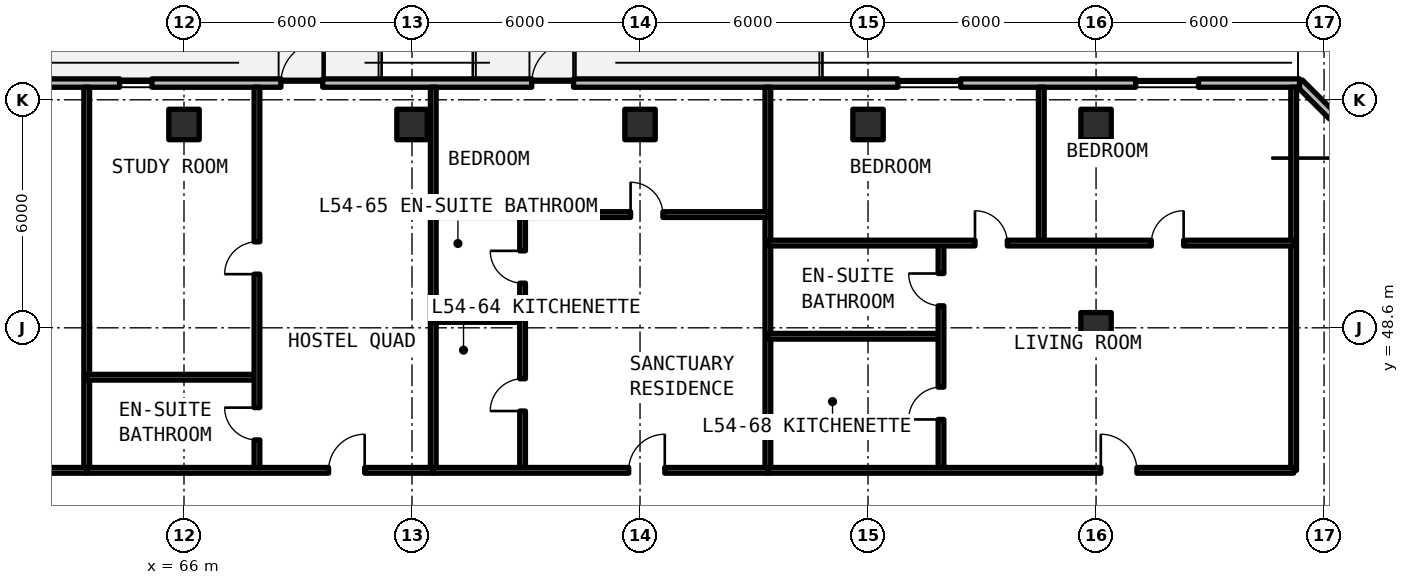
"""IFC4 building model, lengths in metres.
Left out: names, types, materials, properties, quantities, classifications, styles, units other than length and angle.
Written with IfcOpenShell. Run it as: python <this file> out.ifc"""

import sys

from ifc_helpers import new_model, si_unit, direction, frame, frame_2d, origin, origin_2d, place, context, subcontext, project, spatial, rectangle, extrude, element, fill, save


model = new_model("IFC4")
c1 = context("Model", 3, precision=1e-05, world=origin(), true_north=direction((0.0, 1.0)))
c2 = subcontext(c1, "Body", "Model", "MODEL_VIEW")
j1 = project(units=[si_unit("LENGTHUNIT", "METRE"), si_unit("PLANEANGLEUNIT", "RADIAN")], contexts=[c1])
p1 = place(None, origin())
s1 = spatial("IfcSite", under=j1, at=p1, CompositionType="ELEMENT")
p2 = place(p1, origin())
s2 = spatial("IfcBuilding", under=s1, at=p2, CompositionType="ELEMENT")
p3 = place(p2, frame((0.0, 0.0, 195.03)))
s3 = spatial("IfcBuildingStorey", under=s2, at=p3, CompositionType="ELEMENT", Elevation=195.03)
for number, where, z_axis, x_axis in (
    (1, (90.0, 48.6, 0.0), (0.0, 0.0, 1.0), (1.0, 0.0, 0.0)),
    (2, (66.0, 53.95, 0.0), (0.0, 0.0, 1.0), (1.0, 0.0, 0.0)),
    (3, (72.0, 53.95, 0.0), (0.0, 0.0, 1.0), (1.0, 0.0, 0.0)),
    (4, (78.0, 53.95, 0.0), (0.0, 0.0, 1.0), (1.0, 0.0, 0.0)),
    (5, (84.0, 53.95, 0.0), (0.0, 0.0, 1.0), (1.0, 0.0, 0.0)),
    (6, (90.0, 53.95, 0.0), (0.0, 0.0, 1.0), (1.0, 0.0, 0.0)),
):
    element("IfcColumn", number, at=place(p3, frame(where, z_axis=z_axis, x_axis=x_axis)), inside=s3, PredefinedType="COLUMN", context=c2, shape_type="SweptSolid", body=[
        extrude(rectangle(XDim=0.8, YDim=0.8, at=origin_2d()), origin(), (0.0, 0.0, 1.0), 3.3),
    ])
p4 = place(p3, frame((99.49, 50.904, 0.0), z_axis=(0.0, 0.0, 1.0), x_axis=(-0.707085909342, 0.707127652415, 0.0)))
e7 = element("IfcWall", 7, at=p4, inside=s3, PredefinedType="SOLIDWALL", context=c2, shape_type="SweptSolid", body=[
    extrude(rectangle(XDim=5.849, YDim=0.22, at=frame_2d((2.924, 0.0))), origin(), (0.0, 0.0, 1.0), 3.08),
])
p5 = place(p4, frame((1.224, 0.0, 0.78)))
e8 = element("IfcOpeningElement", 8, at=p5, cuts=e7, PredefinedType="OPENING", context=c2, shape_type="SweptSolid", body=[
    extrude(rectangle(XDim=3.4, YDim=1.66, at=frame_2d((1.7, 0.83))), frame((0.0, 0.12, 0.0), z_axis=(0.0, -1.0, 0.0), x_axis=(1.0, 0.0, 0.0)), (0.0, 0.0, 1.0), 0.24),
])
p6 = place(p3, frame((95.354, 55.04, 0.0), z_axis=(0.0, 0.0, 1.0), x_axis=(-1.0, 0.0, 0.0)))
e9 = element("IfcWall", 9, at=p6, inside=s3, PredefinedType="SOLIDWALL", context=c2, shape_type="SweptSolid", body=[
    extrude(rectangle(XDim=43.244, YDim=0.22, at=frame_2d((21.622, 0.0))), origin(), (0.0, 0.0, 1.0), 3.08),
])
p7 = place(p6, frame((25.704, 0.0, 0.0)))
e10 = element("IfcOpeningElement", 10, at=p7, cuts=e9, PredefinedType="OPENING", context=c2, shape_type="SweptSolid", body=[
    extrude(rectangle(XDim=1.1, YDim=2.15, at=frame_2d((0.55, 1.075))), frame((0.0, 0.12, 0.0), z_axis=(0.0, -1.0, 0.0), x_axis=(1.0, 0.0, 0.0)), (0.0, 0.0, 1.0), 0.24),
])
p8 = place(p6, frame((19.104, 0.0, 0.0)))
e11 = element("IfcOpeningElement", 11, at=p8, cuts=e9, PredefinedType="OPENING", context=c2, shape_type="SweptSolid", body=[
    extrude(rectangle(XDim=1.1, YDim=2.15, at=frame_2d((0.55, 1.075))), frame((0.0, 0.12, 0.0), z_axis=(0.0, -1.0, 0.0), x_axis=(1.0, 0.0, 0.0)), (0.0, 0.0, 1.0), 0.24),
])
p9 = place(p6, frame((36.749, 0.0, 0.78)))
e12 = element("IfcOpeningElement", 12, at=p9, cuts=e9, PredefinedType="OPENING", context=c2, shape_type="SweptSolid", body=[
    extrude(rectangle(XDim=1.65, YDim=1.66, at=frame_2d((0.825, 0.83))), frame((0.0, 0.12, 0.0), z_axis=(0.0, -1.0, 0.0), x_axis=(1.0, 0.0, 0.0)), (0.0, 0.0, 1.0), 0.24),
])
p10 = place(p6, frame((30.199, 0.0, 0.78)))
e13 = element("IfcOpeningElement", 13, at=p10, cuts=e9, PredefinedType="OPENING", context=c2, shape_type="SweptSolid", body=[
    extrude(rectangle(XDim=0.85, YDim=1.65, at=frame_2d((0.425, 0.825))), frame((0.0, 0.12, 0.0), z_axis=(0.0, -1.0, 0.0), x_axis=(1.0, 0.0, 0.0)), (0.0, 0.0, 1.0), 0.24),
])
p11 = place(p6, frame((8.918, 0.0, 0.78)))
e14 = element("IfcOpeningElement", 14, at=p11, cuts=e9, PredefinedType="OPENING", context=c2, shape_type="SweptSolid", body=[
    extrude(rectangle(XDim=1.65, YDim=1.66, at=frame_2d((0.825, 0.83))), frame((0.0, 0.12, 0.0), z_axis=(0.0, -1.0, 0.0), x_axis=(1.0, 0.0, 0.0)), (0.0, 0.0, 1.0), 0.24),
])
p12 = place(p6, frame((2.66, 0.0, 0.78)))
e15 = element("IfcOpeningElement", 15, at=p12, cuts=e9, PredefinedType="OPENING", context=c2, shape_type="SweptSolid", body=[
    extrude(rectangle(XDim=1.65, YDim=1.66, at=frame_2d((0.825, 0.83))), frame((0.0, 0.12, 0.0), z_axis=(0.0, -1.0, 0.0), x_axis=(1.0, 0.0, 0.0)), (0.0, 0.0, 1.0), 0.24),
])
for number, where, z_axis, x_axis in (
    (16, (95.2, 44.85, 0.0), (0.0, 0.0, 1.0), (0.0, 1.0, 0.0)),
    (17, (63.44, 44.85, 0.0), (0.0, 0.0, 1.0), (0.0, 1.0, 0.0)),
):
    element("IfcWall", number, at=place(p3, frame(where, z_axis=z_axis, x_axis=x_axis)), inside=s3, PredefinedType="SOLIDWALL", context=c2, shape_type="SweptSolid", body=[
        extrude(rectangle(XDim=10.08, YDim=0.15, at=frame_2d((5.04, 0.0))), origin(), (0.0, 0.0, 1.0), 2.35),
    ])
p13 = place(p3, frame((52.12, 44.85, 0.0), z_axis=(0.0, 0.0, 1.0), x_axis=(1.0, 0.0, 0.0)))
e18 = element("IfcWall", 18, at=p13, inside=s3, PredefinedType="SOLIDWALL", context=c2, shape_type="SweptSolid", body=[
    extrude(rectangle(XDim=11.32, YDim=0.15, at=frame_2d((5.66, 0.0))), origin(), (0.0, 0.0, 1.0), 2.35),
])
p14 = place(p13, frame((5.11, 0.0, 0.0)))
e19 = element("IfcOpeningElement", 19, at=p14, cuts=e18, PredefinedType="OPENING", context=c2, shape_type="SweptSolid", body=[
    extrude(rectangle(XDim=1.1, YDim=2.15, at=frame_2d((0.55, 1.075))), frame((0.0, 0.085, 0.0), z_axis=(0.0, -1.0, 0.0), x_axis=(1.0, 0.0, 0.0)), (0.0, 0.0, 1.0), 0.17),
])
p15 = place(p3, frame((72.559, 44.85, 0.0), z_axis=(0.0, 0.0, 1.0), x_axis=(0.0, 1.0, 0.0)))
e20 = element("IfcWall", 20, at=p15, inside=s3, PredefinedType="SOLIDWALL", context=c2, shape_type="SweptSolid", body=[
    extrude(rectangle(XDim=10.08, YDim=0.15, at=frame_2d((5.04, 0.0))), origin(), (0.0, 0.0, 1.0), 2.35),
])
p16 = place(p3, frame((63.44, 47.3, 0.0), z_axis=(0.0, 0.0, 1.0), x_axis=(1.0, 0.0, 0.0)))
e21 = element("IfcWall", 21, at=p16, inside=s3, PredefinedType="PARTITIONING", context=c2, shape_type="SweptSolid", body=[
    extrude(rectangle(XDim=4.48, YDim=0.15, at=frame_2d((2.24, 0.0))), origin(), (0.0, 0.0, 1.0), 2.35),
])
p17 = place(p3, frame((67.92, 44.85, 0.0), z_axis=(0.0, 0.0, 1.0), x_axis=(0.0, 1.0, 0.0)))
e22 = element("IfcWall", 22, at=p17, inside=s3, PredefinedType="PARTITIONING", context=c2, shape_type="SweptSolid", body=[
    extrude(rectangle(XDim=10.08, YDim=0.15, at=frame_2d((5.04, 0.0))), origin(), (0.0, 0.0, 1.0), 2.35),
])
p18 = place(p17, frame((0.8, 0.0, 0.0)))
e23 = element("IfcOpeningElement", 23, at=p18, cuts=e22, PredefinedType="OPENING", context=c2, shape_type="SweptSolid", body=[
    extrude(rectangle(XDim=0.85, YDim=2.1, at=frame_2d((0.425, 1.05))), frame((0.0, 0.085, 0.0), z_axis=(0.0, -1.0, 0.0), x_axis=(1.0, 0.0, 0.0)), (0.0, 0.0, 1.0), 0.17),
])
p19 = place(p17, frame((5.162, 0.0, 0.0)))
e24 = element("IfcOpeningElement", 24, at=p19, cuts=e22, PredefinedType="OPENING", context=c2, shape_type="SweptSolid", body=[
    extrude(rectangle(XDim=0.85, YDim=2.1, at=frame_2d((0.425, 1.05))), frame((0.0, 0.085, 0.0), z_axis=(0.0, -1.0, 0.0), x_axis=(1.0, 0.0, 0.0)), (0.0, 0.0, 1.0), 0.17),
])
p20 = place(p3, frame((63.44, 44.85, 0.0), z_axis=(0.0, 0.0, 1.0), x_axis=(1.0, 0.0, 0.0)))
e25 = element("IfcWall", 25, at=p20, inside=s3, PredefinedType="SOLIDWALL", context=c2, shape_type="SweptSolid", body=[
    extrude(rectangle(XDim=9.119, YDim=0.15, at=frame_2d((4.56, 0.0))), origin(), (0.0, 0.0, 1.0), 2.35),
])
p21 = place(p20, frame((6.365, 0.0, 0.0)))
e26 = element("IfcOpeningElement", 26, at=p21, cuts=e25, PredefinedType="OPENING", context=c2, shape_type="SweptSolid", body=[
    extrude(rectangle(XDim=0.95, YDim=2.15, at=frame_2d((0.475, 1.075))), frame((0.0, 0.085, 0.0), z_axis=(0.0, -1.0, 0.0), x_axis=(1.0, 0.0, 0.0)), (0.0, 0.0, 1.0), 0.17),
])
p22 = place(p3, frame((81.364, 44.85, 0.0), z_axis=(0.0, 0.0, 1.0), x_axis=(0.0, 1.0, 0.0)))
e27 = element("IfcWall", 27, at=p22, inside=s3, PredefinedType="SOLIDWALL", context=c2, shape_type="SweptSolid", body=[
    extrude(rectangle(XDim=10.08, YDim=0.15, at=frame_2d((5.04, 0.0))), origin(), (0.0, 0.0, 1.0), 2.35),
])
p23 = place(p3, frame((72.559, 48.82, 0.0), z_axis=(0.0, 0.0, 1.0), x_axis=(1.0, 0.0, 0.0)))
e28 = element("IfcWall", 28, at=p23, inside=s3, PredefinedType="PARTITIONING", context=c2, shape_type="SweptSolid", body=[
    extrude(rectangle(XDim=2.35, YDim=0.15, at=frame_2d((1.175, 0.0))), origin(), (0.0, 0.0, 1.0), 2.35),
])
p24 = place(p3, frame((74.909, 44.85, 0.0), z_axis=(0.0, 0.0, 1.0), x_axis=(0.0, 1.0, 0.0)))
e29 = element("IfcWall", 29, at=p24, inside=s3, PredefinedType="PARTITIONING", context=c2, shape_type="SweptSolid", body=[
    extrude(rectangle(XDim=6.729, YDim=0.15, at=frame_2d((3.365, 0.0))), origin(), (0.0, 0.0, 1.0), 2.35),
])
p25 = place(p24, frame((1.56, 0.0, 0.0)))
e30 = element("IfcOpeningElement", 30, at=p25, cuts=e29, PredefinedType="OPENING", context=c2, shape_type="SweptSolid", body=[
    extrude(rectangle(XDim=0.85, YDim=2.1, at=frame_2d((0.425, 1.05))), frame((0.0, 0.085, 0.0), z_axis=(0.0, -1.0, 0.0), x_axis=(1.0, 0.0, 0.0)), (0.0, 0.0, 1.0), 0.17),
])
p26 = place(p24, frame((4.925, 0.0, 0.0)))
e31 = element("IfcOpeningElement", 31, at=p26, cuts=e29, PredefinedType="OPENING", context=c2, shape_type="SweptSolid", body=[
    extrude(rectangle(XDim=0.85, YDim=2.1, at=frame_2d((0.425, 1.05))), frame((0.0, 0.085, 0.0), z_axis=(0.0, -1.0, 0.0), x_axis=(1.0, 0.0, 0.0)), (0.0, 0.0, 1.0), 0.17),
])
p27 = place(p3, frame((72.559, 51.58, 0.0), z_axis=(0.0, 0.0, 1.0), x_axis=(1.0, 0.0, 0.0)))
e32 = element("IfcWall", 32, at=p27, inside=s3, PredefinedType="PARTITIONING", context=c2, shape_type="SweptSolid", body=[
    extrude(rectangle(XDim=8.805, YDim=0.15, at=frame_2d((4.402, 0.0))), origin(), (0.0, 0.0, 1.0), 2.35),
])
p28 = place(p27, frame((5.192, 0.0, 0.0)))
e33 = element("IfcOpeningElement", 33, at=p28, cuts=e32, PredefinedType="OPENING", context=c2, shape_type="SweptSolid", body=[
    extrude(rectangle(XDim=0.85, YDim=2.1, at=frame_2d((0.425, 1.05))), frame((0.0, 0.085, 0.0), z_axis=(0.0, -1.0, 0.0), x_axis=(1.0, 0.0, 0.0)), (0.0, 0.0, 1.0), 0.17),
])
p29 = place(p3, frame((72.559, 44.85, 0.0), z_axis=(0.0, 0.0, 1.0), x_axis=(1.0, 0.0, 0.0)))
e34 = element("IfcWall", 34, at=p29, inside=s3, PredefinedType="SOLIDWALL", context=c2, shape_type="SweptSolid", body=[
    extrude(rectangle(XDim=8.805, YDim=0.15, at=frame_2d((4.402, 0.0))), origin(), (0.0, 0.0, 1.0), 2.35),
])
p30 = place(p29, frame((5.142, 0.0, 0.0)))
e35 = element("IfcOpeningElement", 35, at=p30, cuts=e34, PredefinedType="OPENING", context=c2, shape_type="SweptSolid", body=[
    extrude(rectangle(XDim=0.95, YDim=2.15, at=frame_2d((0.475, 1.075))), frame((0.0, 0.085, 0.0), z_axis=(0.0, -1.0, 0.0), x_axis=(1.0, 0.0, 0.0)), (0.0, 0.0, 1.0), 0.17),
])
p31 = place(p3, frame((81.364, 48.378, 0.0), z_axis=(0.0, 0.0, 1.0), x_axis=(1.0, 0.0, 0.0)))
e36 = element("IfcWall", 36, at=p31, inside=s3, PredefinedType="PARTITIONING", context=c2, shape_type="SweptSolid", body=[
    extrude(rectangle(XDim=4.556, YDim=0.15, at=frame_2d((2.278, 0.0))), origin(), (0.0, 0.0, 1.0), 2.35),
])
p32 = place(p3, frame((85.92, 44.85, 0.0), z_axis=(0.0, 0.0, 1.0), x_axis=(0.0, 1.0, 0.0)))
e37 = element("IfcWall", 37, at=p32, inside=s3, PredefinedType="PARTITIONING", context=c2, shape_type="SweptSolid", body=[
    extrude(rectangle(XDim=5.98, YDim=0.15, at=frame_2d((2.99, 0.0))), origin(), (0.0, 0.0, 1.0), 2.35),
])
p33 = place(p32, frame((1.339, 0.0, 0.0)))
e38 = element("IfcOpeningElement", 38, at=p33, cuts=e37, PredefinedType="OPENING", context=c2, shape_type="SweptSolid", body=[
    extrude(rectangle(XDim=0.85, YDim=2.1, at=frame_2d((0.425, 1.05))), frame((0.0, 0.085, 0.0), z_axis=(0.0, -1.0, 0.0), x_axis=(1.0, 0.0, 0.0)), (0.0, 0.0, 1.0), 0.17),
])
p34 = place(p32, frame((4.329, 0.0, 0.0)))
e39 = element("IfcOpeningElement", 39, at=p34, cuts=e37, PredefinedType="OPENING", context=c2, shape_type="SweptSolid", body=[
    extrude(rectangle(XDim=0.85, YDim=2.1, at=frame_2d((0.425, 1.05))), frame((0.0, 0.085, 0.0), z_axis=(0.0, -1.0, 0.0), x_axis=(1.0, 0.0, 0.0)), (0.0, 0.0, 1.0), 0.17),
])
p35 = place(p3, frame((88.559, 50.83, 0.0), z_axis=(0.0, 0.0, 1.0), x_axis=(0.0, 1.0, 0.0)))
e40 = element("IfcWall", 40, at=p35, inside=s3, PredefinedType="PARTITIONING", context=c2, shape_type="SweptSolid", body=[
    extrude(rectangle(XDim=4.1, YDim=0.15, at=frame_2d((2.05, 0.0))), origin(), (0.0, 0.0, 1.0), 2.35),
])
p36 = place(p3, frame((81.364, 50.83, 0.0), z_axis=(0.0, 0.0, 1.0), x_axis=(1.0, 0.0, 0.0)))
e41 = element("IfcWall", 41, at=p36, inside=s3, PredefinedType="PARTITIONING", context=c2, shape_type="SweptSolid", body=[
    extrude(rectangle(XDim=13.836, YDim=0.15, at=frame_2d((6.918, 0.0))), origin(), (0.0, 0.0, 1.0), 2.35),
])
p37 = place(p36, frame((5.45, 0.0, 0.0)))
e42 = element("IfcOpeningElement", 42, at=p37, cuts=e41, PredefinedType="OPENING", context=c2, shape_type="SweptSolid", body=[
    extrude(rectangle(XDim=0.85, YDim=2.1, at=frame_2d((0.425, 1.05))), frame((0.0, 0.085, 0.0), z_axis=(0.0, -1.0, 0.0), x_axis=(1.0, 0.0, 0.0)), (0.0, 0.0, 1.0), 0.17),
])
p38 = place(p36, frame((10.09, 0.0, 0.0)))
e43 = element("IfcOpeningElement", 43, at=p38, cuts=e41, PredefinedType="OPENING", context=c2, shape_type="SweptSolid", body=[
    extrude(rectangle(XDim=0.85, YDim=2.1, at=frame_2d((0.425, 1.05))), frame((0.0, 0.085, 0.0), z_axis=(0.0, -1.0, 0.0), x_axis=(1.0, 0.0, 0.0)), (0.0, 0.0, 1.0), 0.17),
])
p39 = place(p3, frame((81.364, 44.85, 0.0), z_axis=(0.0, 0.0, 1.0), x_axis=(1.0, 0.0, 0.0)))
e44 = element("IfcWall", 44, at=p39, inside=s3, PredefinedType="SOLIDWALL", context=c2, shape_type="SweptSolid", body=[
    extrude(rectangle(XDim=13.836, YDim=0.15, at=frame_2d((6.918, 0.0))), origin(), (0.0, 0.0, 1.0), 2.35),
])
p40 = place(p39, frame((8.761, 0.0, 0.0)))
e45 = element("IfcOpeningElement", 45, at=p40, cuts=e44, PredefinedType="OPENING", context=c2, shape_type="SweptSolid", body=[
    extrude(rectangle(XDim=0.95, YDim=2.15, at=frame_2d((0.475, 1.075))), frame((0.0, 0.085, 0.0), z_axis=(0.0, -1.0, 0.0), x_axis=(1.0, 0.0, 0.0)), (0.0, 0.0, 1.0), 0.17),
])
p41 = place(p7, frame((1.1, 0.0, 0.0), z_axis=(0.0, 0.0, 1.0), x_axis=(-1.0, 0.0, 0.0)))
e46 = element("IfcDoor", 46, at=p41, inside=s3, OperationType="SINGLE_SWING_LEFT", PredefinedType="DOOR", context=c2, shape_type="SweptSolid", body=[
    extrude(rectangle(XDim=1.1, YDim=2.15, at=frame_2d((0.55, 1.075))), frame((0.0, 0.025, 0.0), z_axis=(0.0, -1.0, 0.0), x_axis=(1.0, 0.0, 0.0)), (0.0, 0.0, 1.0), 0.05),
])
fill(e10, e46)
p42 = place(p8, frame((1.1, 0.0, 0.0), z_axis=(0.0, 0.0, 1.0), x_axis=(-1.0, 0.0, 0.0)))
e47 = element("IfcDoor", 47, at=p42, inside=s3, OperationType="SINGLE_SWING_RIGHT", PredefinedType="DOOR", context=c2, shape_type="SweptSolid", body=[
    extrude(rectangle(XDim=1.1, YDim=2.15, at=frame_2d((0.55, 1.075))), frame((0.0, 0.025, 0.0), z_axis=(0.0, -1.0, 0.0), x_axis=(1.0, 0.0, 0.0)), (0.0, 0.0, 1.0), 0.05),
])
fill(e11, e47)
p43 = place(p10, origin())
e48 = element("IfcWindow", 48, at=p43, inside=s3, PartitioningType="SINGLE_PANEL", PredefinedType="WINDOW", context=c2, shape_type="SweptSolid", body=[
    extrude(rectangle(XDim=0.85, YDim=1.65, at=frame_2d((0.425, 0.825))), frame((0.0, 0.03, 0.0), z_axis=(0.0, -1.0, 0.0), x_axis=(1.0, 0.0, 0.0)), (0.0, 0.0, 1.0), 0.06),
])
fill(e13, e48)
p44 = place(p11, origin())
e49 = element("IfcWindow", 49, at=p44, inside=s3, PartitioningType="SINGLE_PANEL", PredefinedType="WINDOW", context=c2, shape_type="SweptSolid", body=[
    extrude(rectangle(XDim=1.65, YDim=1.66, at=frame_2d((0.825, 0.83))), frame((0.0, 0.03, 0.0), z_axis=(0.0, -1.0, 0.0), x_axis=(1.0, 0.0, 0.0)), (0.0, 0.0, 1.0), 0.06),
])
fill(e14, e49)
p45 = place(p12, origin())
e50 = element("IfcWindow", 50, at=p45, inside=s3, PartitioningType="SINGLE_PANEL", PredefinedType="WINDOW", context=c2, shape_type="SweptSolid", body=[
    extrude(rectangle(XDim=1.65, YDim=1.66, at=frame_2d((0.825, 0.83))), frame((0.0, 0.03, 0.0), z_axis=(0.0, -1.0, 0.0), x_axis=(1.0, 0.0, 0.0)), (0.0, 0.0, 1.0), 0.06),
])
fill(e15, e50)
p46 = place(p18, origin())
e51 = element("IfcDoor", 51, at=p46, inside=s3, OperationType="SINGLE_SWING_RIGHT", PredefinedType="DOOR", context=c2, shape_type="SweptSolid", body=[
    extrude(rectangle(XDim=0.85, YDim=2.1, at=frame_2d((0.425, 1.05))), frame((0.0, 0.025, 0.0), z_axis=(0.0, -1.0, 0.0), x_axis=(1.0, 0.0, 0.0)), (0.0, 0.0, 1.0), 0.05),
])
fill(e23, e51)
p47 = place(p19, origin())
e52 = element("IfcDoor", 52, at=p47, inside=s3, OperationType="SINGLE_SWING_LEFT", PredefinedType="DOOR", context=c2, shape_type="SweptSolid", body=[
    extrude(rectangle(XDim=0.85, YDim=2.1, at=frame_2d((0.425, 1.05))), frame((0.0, 0.025, 0.0), z_axis=(0.0, -1.0, 0.0), x_axis=(1.0, 0.0, 0.0)), (0.0, 0.0, 1.0), 0.05),
])
fill(e24, e52)
p48 = place(p21, origin())
e53 = element("IfcDoor", 53, at=p48, inside=s3, OperationType="SINGLE_SWING_RIGHT", PredefinedType="DOOR", context=c2, shape_type="SweptSolid", body=[
    extrude(rectangle(XDim=0.95, YDim=2.15, at=frame_2d((0.475, 1.075))), frame((0.0, 0.025, 0.0), z_axis=(0.0, -1.0, 0.0), x_axis=(1.0, 0.0, 0.0)), (0.0, 0.0, 1.0), 0.05),
])
fill(e26, e53)
p49 = place(p25, origin())
e54 = element("IfcDoor", 54, at=p49, inside=s3, OperationType="SINGLE_SWING_LEFT", PredefinedType="DOOR", context=c2, shape_type="SweptSolid", body=[
    extrude(rectangle(XDim=0.85, YDim=2.1, at=frame_2d((0.425, 1.05))), frame((0.0, 0.025, 0.0), z_axis=(0.0, -1.0, 0.0), x_axis=(1.0, 0.0, 0.0)), (0.0, 0.0, 1.0), 0.05),
])
fill(e30, e54)
p50 = place(p26, origin())
e55 = element("IfcDoor", 55, at=p50, inside=s3, OperationType="SINGLE_SWING_RIGHT", PredefinedType="DOOR", context=c2, shape_type="SweptSolid", body=[
    extrude(rectangle(XDim=0.85, YDim=2.1, at=frame_2d((0.425, 1.05))), frame((0.0, 0.025, 0.0), z_axis=(0.0, -1.0, 0.0), x_axis=(1.0, 0.0, 0.0)), (0.0, 0.0, 1.0), 0.05),
])
fill(e31, e55)
p51 = place(p28, origin())
e56 = element("IfcDoor", 56, at=p51, inside=s3, OperationType="SINGLE_SWING_LEFT", PredefinedType="DOOR", context=c2, shape_type="SweptSolid", body=[
    extrude(rectangle(XDim=0.85, YDim=2.1, at=frame_2d((0.425, 1.05))), frame((0.0, 0.025, 0.0), z_axis=(0.0, -1.0, 0.0), x_axis=(1.0, 0.0, 0.0)), (0.0, 0.0, 1.0), 0.05),
])
fill(e33, e56)
p52 = place(p30, origin())
e57 = element("IfcDoor", 57, at=p52, inside=s3, OperationType="SINGLE_SWING_RIGHT", PredefinedType="DOOR", context=c2, shape_type="SweptSolid", body=[
    extrude(rectangle(XDim=0.95, YDim=2.15, at=frame_2d((0.475, 1.075))), frame((0.0, 0.025, 0.0), z_axis=(0.0, -1.0, 0.0), x_axis=(1.0, 0.0, 0.0)), (0.0, 0.0, 1.0), 0.05),
])
fill(e35, e57)
p53 = place(p33, origin())
e58 = element("IfcDoor", 58, at=p53, inside=s3, OperationType="SINGLE_SWING_LEFT", PredefinedType="DOOR", context=c2, shape_type="SweptSolid", body=[
    extrude(rectangle(XDim=0.85, YDim=2.1, at=frame_2d((0.425, 1.05))), frame((0.0, 0.025, 0.0), z_axis=(0.0, -1.0, 0.0), x_axis=(1.0, 0.0, 0.0)), (0.0, 0.0, 1.0), 0.05),
])
fill(e38, e58)
p54 = place(p34, origin())
e59 = element("IfcDoor", 59, at=p54, inside=s3, OperationType="SINGLE_SWING_RIGHT", PredefinedType="DOOR", context=c2, shape_type="SweptSolid", body=[
    extrude(rectangle(XDim=0.85, YDim=2.1, at=frame_2d((0.425, 1.05))), frame((0.0, 0.025, 0.0), z_axis=(0.0, -1.0, 0.0), x_axis=(1.0, 0.0, 0.0)), (0.0, 0.0, 1.0), 0.05),
])
fill(e39, e59)
p55 = place(p37, origin())
e60 = element("IfcDoor", 60, at=p55, inside=s3, OperationType="SINGLE_SWING_LEFT", PredefinedType="DOOR", context=c2, shape_type="SweptSolid", body=[
    extrude(rectangle(XDim=0.85, YDim=2.1, at=frame_2d((0.425, 1.05))), frame((0.0, 0.025, 0.0), z_axis=(0.0, -1.0, 0.0), x_axis=(1.0, 0.0, 0.0)), (0.0, 0.0, 1.0), 0.05),
])
fill(e42, e60)
p56 = place(p38, origin())
e61 = element("IfcDoor", 61, at=p56, inside=s3, OperationType="SINGLE_SWING_RIGHT", PredefinedType="DOOR", context=c2, shape_type="SweptSolid", body=[
    extrude(rectangle(XDim=0.85, YDim=2.1, at=frame_2d((0.425, 1.05))), frame((0.0, 0.025, 0.0), z_axis=(0.0, -1.0, 0.0), x_axis=(1.0, 0.0, 0.0)), (0.0, 0.0, 1.0), 0.05),
])
fill(e43, e61)
p57 = place(p40, origin())
e62 = element("IfcDoor", 62, at=p57, inside=s3, OperationType="SINGLE_SWING_LEFT", PredefinedType="DOOR", context=c2, shape_type="SweptSolid", body=[
    extrude(rectangle(XDim=0.95, YDim=2.15, at=frame_2d((0.475, 1.075))), frame((0.0, 0.025, 0.0), z_axis=(0.0, -1.0, 0.0), x_axis=(1.0, 0.0, 0.0)), (0.0, 0.0, 1.0), 0.05),
])
fill(e45, e62)
save(model, sys.argv[1])
